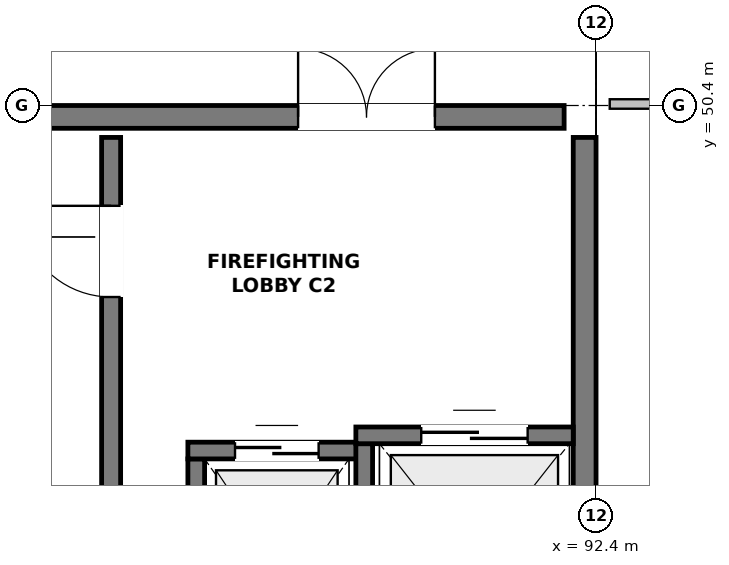
"""IFC4 building model, lengths in metres.
Left out: names, types, materials, properties, quantities, classifications, styles, units other than length and angle.
Written with IfcOpenShell. Run it as: python <this file> out.ifc"""

import sys

from ifc_helpers import new_model, si_unit, direction, frame, frame_2d, origin, place, context, subcontext, project, spatial, rectangle, extrude, element, fill, save


model = new_model("IFC4")
c1 = context("Model", 3, precision=1e-05, world=origin(), true_north=direction((0.0, 1.0)))
c2 = subcontext(c1, "Body", "Model", "MODEL_VIEW")
j1 = project(units=[si_unit("LENGTHUNIT", "METRE"), si_unit("PLANEANGLEUNIT", "RADIAN")], contexts=[c1])
p1 = place(None, origin())
s1 = spatial("IfcSite", under=j1, at=p1, CompositionType="ELEMENT")
p2 = place(p1, origin())
s2 = spatial("IfcBuilding", under=s1, at=p2, CompositionType="ELEMENT")
p3 = place(p2, frame((0.0, 0.0, 5.1)))
s3 = spatial("IfcBuildingStorey", under=s2, at=p3, CompositionType="ELEMENT", Elevation=5.1)
p4 = place(p3, frame((76.02, 50.25, 0.0), z_axis=(0.0, 0.0, 1.0), x_axis=(1.0, 0.0, 0.0)))
e1 = element("IfcWall", 1, at=p4, inside=s3, PredefinedType="SHEAR", context=c2, shape_type="SweptSolid", body=[
    extrude(rectangle(XDim=15.96, YDim=0.3, at=frame_2d((7.98, 0.0))), origin(), (0.0, 0.0, 1.0), 4.5),
])
p5 = place(p4, frame((12.46, 0.0, 0.0)))
e2 = element("IfcOpeningElement", 2, at=p5, cuts=e1, PredefinedType="OPENING", context=c2, shape_type="SweptSolid", body=[
    extrude(rectangle(XDim=1.8, YDim=2.2, at=frame_2d((0.9, 1.1))), frame((0.0, 0.162, 0.0), z_axis=(0.0, -1.0, 0.0), x_axis=(1.0, 0.0, 0.0)), (0.0, 0.0, 1.0), 0.324),
])
p6 = place(p3, frame((92.25, 42.42, 0.0), z_axis=(0.0, 0.0, 1.0), x_axis=(0.0, 1.0, 0.0)))
e3 = element("IfcWall", 3, at=p6, inside=s3, PredefinedType="SHEAR", context=c2, shape_type="SweptSolid", body=[
    extrude(rectangle(XDim=7.56, YDim=0.3, at=frame_2d((3.78, 0.0))), origin(), (0.0, 0.0, 1.0), 4.5),
])
p7 = place(p3, frame((86.02, 42.42, 0.0), z_axis=(0.0, 0.0, 1.0), x_axis=(0.0, 1.0, 0.0)))
e4 = element("IfcWall", 4, at=p7, inside=s3, PredefinedType="SHEAR", context=c2, shape_type="SweptSolid", body=[
    extrude(rectangle(XDim=7.56, YDim=0.25, at=frame_2d((3.78, 0.0))), origin(), (0.0, 0.0, 1.0), 4.5),
])
p8 = place(p7, frame((5.46, 0.0, 0.0)))
e5 = element("IfcOpeningElement", 5, at=p8, cuts=e4, PredefinedType="OPENING", context=c2, shape_type="SweptSolid", body=[
    extrude(rectangle(XDim=1.2, YDim=2.2, at=frame_2d((0.6, 1.1))), frame((0.0, 0.137, 0.0), z_axis=(0.0, -1.0, 0.0), x_axis=(1.0, 0.0, 0.0)), (0.0, 0.0, 1.0), 0.274),
])
p9 = place(p3, frame((87.14, 43.05, 0.0), z_axis=(0.0, 0.0, 1.0), x_axis=(0.0, 1.0, 0.0)))
e6 = element("IfcWall", 6, at=p9, inside=s3, PredefinedType="SOLIDWALL", context=c2, shape_type="SweptSolid", body=[
    extrude(rectangle(XDim=2.7, YDim=0.22, at=frame_2d((1.35, 0.0))), origin(), (0.0, 0.0, 1.0), 4.5),
])
p10 = place(p3, frame((87.03, 45.86, 0.0), z_axis=(0.0, 0.0, 1.0), x_axis=(1.0, 0.0, 0.0)))
e7 = element("IfcWall", 7, at=p10, inside=s3, PredefinedType="SOLIDWALL", context=c2, shape_type="SweptSolid", body=[
    extrude(rectangle(XDim=2.43, YDim=0.22, at=frame_2d((1.215, 0.0))), origin(), (0.0, 0.0, 1.0), 4.5),
])
p11 = place(p10, frame((0.62, 0.0, 0.0)))
e8 = element("IfcOpeningElement", 8, at=p11, cuts=e7, PredefinedType="OPENING", context=c2, shape_type="SweptSolid", body=[
    extrude(rectangle(XDim=1.1, YDim=2.15, at=frame_2d((0.55, 1.075))), frame((0.0, 0.122, 0.0), z_axis=(0.0, -1.0, 0.0), x_axis=(1.0, 0.0, 0.0)), (0.0, 0.0, 1.0), 0.244),
])
p12 = place(p3, frame((89.35, 42.85, 0.0), z_axis=(0.0, 0.0, 1.0), x_axis=(0.0, 1.0, 0.0)))
e9 = element("IfcWall", 9, at=p12, inside=s3, PredefinedType="SOLIDWALL", context=c2, shape_type="SweptSolid", body=[
    extrude(rectangle(XDim=3.1, YDim=0.22, at=frame_2d((1.55, 0.0))), origin(), (0.0, 0.0, 1.0), 4.5),
])
p13 = place(p3, frame((89.24, 46.06, 0.0), z_axis=(0.0, 0.0, 1.0), x_axis=(1.0, 0.0, 0.0)))
e10 = element("IfcWall", 10, at=p13, inside=s3, PredefinedType="SOLIDWALL", context=c2, shape_type="SweptSolid", body=[
    extrude(rectangle(XDim=2.86, YDim=0.22, at=frame_2d((1.43, 0.0))), origin(), (0.0, 0.0, 1.0), 4.5),
])
p14 = place(p13, frame((0.86, 0.0, 0.0)))
e11 = element("IfcOpeningElement", 11, at=p14, cuts=e10, PredefinedType="OPENING", context=c2, shape_type="SweptSolid", body=[
    extrude(rectangle(XDim=1.4, YDim=2.2, at=frame_2d((0.7, 1.1))), frame((0.0, 0.122, 0.0), z_axis=(0.0, -1.0, 0.0), x_axis=(1.0, 0.0, 0.0)), (0.0, 0.0, 1.0), 0.244),
])
p15 = place(p3, frame((125.02, 50.42, 0.0), z_axis=(0.0, 0.0, 1.0), x_axis=(-1.0, 0.0, 0.0)))
e12 = element("IfcWall", 12, at=p15, inside=s3, PredefinedType="PARTITIONING", context=c2, shape_type="SweptSolid", body=[
    extrude(rectangle(XDim=32.44, YDim=0.125, at=frame_2d((16.22, 0.0))), origin(), (0.0, 0.0, 1.0), 3.7),
])
p16 = place(p15, frame((12.925, 0.0, 0.0)))
e13 = element("IfcOpeningElement", 13, at=p16, cuts=e12, PredefinedType="OPENING", context=c2, shape_type="SweptSolid", body=[
    extrude(rectangle(XDim=1.4, YDim=2.2, at=frame_2d((0.7, 1.1))), frame((0.0, 0.074, 0.0), z_axis=(0.0, -1.0, 0.0), x_axis=(1.0, 0.0, 0.0)), (0.0, 0.0, 1.0), 0.149),
])
p17 = place(p5, origin())
e14 = element("IfcDoor", 14, at=p17, inside=s3, OperationType="DOUBLE_DOOR_SINGLE_SWING", PredefinedType="DOOR", context=c2, shape_type="SweptSolid", body=[
    extrude(rectangle(XDim=1.8, YDim=2.2, at=frame_2d((0.9, 1.1))), frame((0.0, 0.025, 0.0), z_axis=(0.0, -1.0, 0.0), x_axis=(1.0, 0.0, 0.0)), (0.0, 0.0, 1.0), 0.05),
])
fill(e2, e14)
p18 = place(p8, origin())
e15 = element("IfcDoor", 15, at=p18, inside=s3, OperationType="SINGLE_SWING_RIGHT", PredefinedType="DOOR", context=c2, shape_type="SweptSolid", body=[
    extrude(rectangle(XDim=1.2, YDim=2.2, at=frame_2d((0.6, 1.1))), frame((0.0, 0.025, 0.0), z_axis=(0.0, -1.0, 0.0), x_axis=(1.0, 0.0, 0.0)), (0.0, 0.0, 1.0), 0.05),
])
fill(e5, e15)
p19 = place(p11, origin())
e16 = element("IfcDoor", 16, at=p19, inside=s3, OperationType="DOUBLE_DOOR_SLIDING", PredefinedType="DOOR", context=c2, shape_type="SweptSolid", body=[
    extrude(rectangle(XDim=1.1, YDim=2.15, at=frame_2d((0.55, 1.075))), frame((0.0, 0.025, 0.0), z_axis=(0.0, -1.0, 0.0), x_axis=(1.0, 0.0, 0.0)), (0.0, 0.0, 1.0), 0.05),
])
fill(e8, e16)
p20 = place(p14, origin())
e17 = element("IfcDoor", 17, at=p20, inside=s3, OperationType="DOUBLE_DOOR_SLIDING", PredefinedType="DOOR", context=c2, shape_type="SweptSolid", body=[
    extrude(rectangle(XDim=1.4, YDim=2.2, at=frame_2d((0.7, 1.1))), frame((0.0, 0.025, 0.0), z_axis=(0.0, -1.0, 0.0), x_axis=(1.0, 0.0, 0.0)), (0.0, 0.0, 1.0), 0.05),
])
fill(e11, e17)
save(model, sys.argv[1])
